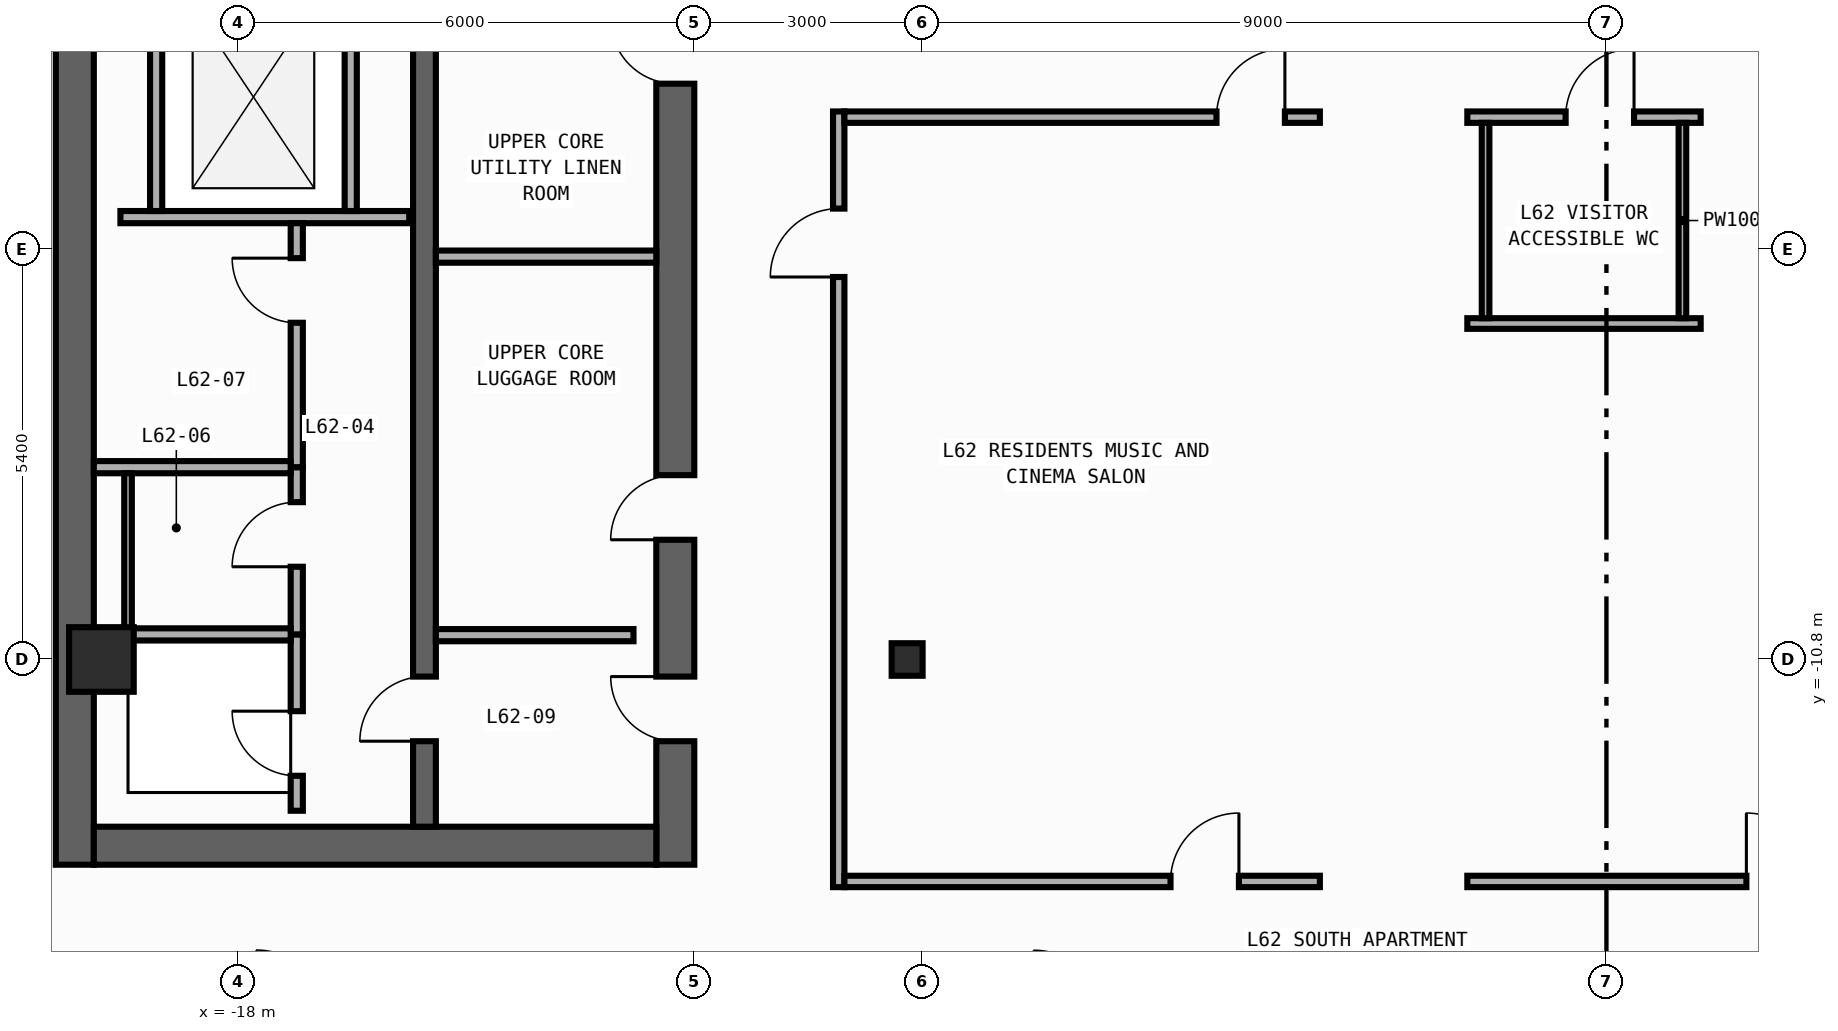
"""IFC4 building model, lengths in metres.
Left out: names, types, materials, properties, quantities, classifications, styles, units other than length and angle.
Written with IfcOpenShell. Run it as: python <this file> out.ifc"""

import sys

from ifc_helpers import new_model, si_unit, direction, frame, frame_2d, origin, origin_2d, place, context, subcontext, project, spatial, rectangle, i_section, extrude, element, fill, save


model = new_model("IFC4")
c1 = context("Model", 3, precision=1e-05, world=origin(), true_north=direction((0.0, 1.0)))
c2 = subcontext(c1, "Body", "Model", "MODEL_VIEW")
j1 = project(units=[si_unit("LENGTHUNIT", "METRE"), si_unit("PLANEANGLEUNIT", "RADIAN")], contexts=[c1])
p1 = place(None, origin())
s1 = spatial("IfcSite", under=j1, at=p1, CompositionType="ELEMENT")
p2 = place(p1, origin())
s2 = spatial("IfcBuilding", under=s1, at=p2, CompositionType="ELEMENT")
p3 = place(p2, frame((0.0, 0.0, 262.0)))
s3 = spatial("IfcBuildingStorey", under=s2, at=p3, CompositionType="ELEMENT", Elevation=262.0)
p4 = place(p3, frame((-20.15, -13.5, 0.0), z_axis=(0.0, 0.0, 1.0), x_axis=(0.0, 1.0, 0.0)))
e1 = element("IfcWall", 1, at=p4, inside=s3, PredefinedType="SHEAR", context=c2, shape_type="SweptSolid", body=[
    extrude(rectangle(XDim=27.0, YDim=0.5, at=frame_2d((13.5, 0.0))), origin(), (0.0, 0.0, 1.0), 3.34),
])
p5 = place(p3, frame((-12.25, -13.5, 0.0), z_axis=(0.0, 0.0, 1.0), x_axis=(0.0, 1.0, 0.0)))
e2 = element("IfcWall", 2, at=p5, inside=s3, PredefinedType="SHEAR", context=c2, shape_type="SweptSolid", body=[
    extrude(rectangle(XDim=27.0, YDim=0.5, at=frame_2d((13.5, 0.0))), origin(), (0.0, 0.0, 1.0), 3.34),
])
p6 = place(p5, frame((15.175, 0.0, 0.0)))
e3 = element("IfcOpeningElement", 3, at=p6, cuts=e2, PredefinedType="OPENING", context=c2, shape_type="SweptSolid", body=[
    extrude(rectangle(XDim=0.85, YDim=2.1, at=frame_2d((0.425, 1.05))), frame((0.0, 0.26, 0.0), z_axis=(0.0, -1.0, 0.0), x_axis=(1.0, 0.0, 0.0)), (0.0, 0.0, 1.0), 0.52),
])
p7 = place(p5, frame((21.275, 0.0, 0.0)))
e4 = element("IfcOpeningElement", 4, at=p7, cuts=e2, PredefinedType="OPENING", context=c2, shape_type="SweptSolid", body=[
    extrude(rectangle(XDim=0.85, YDim=2.1, at=frame_2d((0.425, 1.05))), frame((0.0, 0.26, 0.0), z_axis=(0.0, -1.0, 0.0), x_axis=(1.0, 0.0, 0.0)), (0.0, 0.0, 1.0), 0.52),
])
p8 = place(p5, frame((4.275, 0.0, 0.0)))
e5 = element("IfcOpeningElement", 5, at=p8, cuts=e2, PredefinedType="OPENING", context=c2, shape_type="SweptSolid", body=[
    extrude(rectangle(XDim=0.85, YDim=2.1, at=frame_2d((0.425, 1.05))), frame((0.0, 0.26, 0.0), z_axis=(0.0, -1.0, 0.0), x_axis=(1.0, 0.0, 0.0)), (0.0, 0.0, 1.0), 0.52),
])
p9 = place(p5, frame((10.275, 0.0, 0.0)))
e6 = element("IfcOpeningElement", 6, at=p9, cuts=e2, PredefinedType="OPENING", context=c2, shape_type="SweptSolid", body=[
    extrude(rectangle(XDim=0.85, YDim=2.1, at=frame_2d((0.425, 1.05))), frame((0.0, 0.26, 0.0), z_axis=(0.0, -1.0, 0.0), x_axis=(1.0, 0.0, 0.0)), (0.0, 0.0, 1.0), 0.52),
])
p10 = place(p5, frame((12.725, 0.0, 0.0)))
e7 = element("IfcOpeningElement", 7, at=p10, cuts=e2, PredefinedType="OPENING", context=c2, shape_type="SweptSolid", body=[
    extrude(rectangle(XDim=1.15, YDim=2.2, at=frame_2d((0.575, 1.1))), frame((0.0, 0.26, 0.0), z_axis=(0.0, -1.0, 0.0), x_axis=(1.0, 0.0, 0.0)), (0.0, 0.0, 1.0), 0.52),
])
p11 = place(p5, frame((1.625, 0.0, 0.0)))
e8 = element("IfcOpeningElement", 8, at=p11, cuts=e2, PredefinedType="OPENING", context=c2, shape_type="SweptSolid", body=[
    extrude(rectangle(XDim=0.85, YDim=2.1, at=frame_2d((0.425, 1.05))), frame((0.0, 0.26, 0.0), z_axis=(0.0, -1.0, 0.0), x_axis=(1.0, 0.0, 0.0)), (0.0, 0.0, 1.0), 0.52),
])
p12 = place(p3, frame((-19.9, -13.25, 0.0), z_axis=(0.0, 0.0, 1.0), x_axis=(1.0, 0.0, 0.0)))
e9 = element("IfcWall", 9, at=p12, inside=s3, PredefinedType="SHEAR", context=c2, shape_type="SweptSolid", body=[
    extrude(rectangle(XDim=7.4, YDim=0.5, at=frame_2d((3.7, 0.0))), origin(), (0.0, 0.0, 1.0), 3.34),
])
p13 = place(p3, frame((-15.55, -13.0, 0.0), z_axis=(0.0, 0.0, 1.0), x_axis=(0.0, 1.0, 0.0)))
e10 = element("IfcWall", 10, at=p13, inside=s3, PredefinedType="SHEAR", context=c2, shape_type="SweptSolid", body=[
    extrude(rectangle(XDim=26.0, YDim=0.3, at=frame_2d((13.0, 0.0))), origin(), (0.0, 0.0, 1.0), 3.34),
])
p14 = place(p13, frame((12.225, 0.0, 0.0)))
e11 = element("IfcOpeningElement", 11, at=p14, cuts=e10, PredefinedType="OPENING", context=c2, shape_type="SweptSolid", body=[
    extrude(rectangle(XDim=1.15, YDim=2.2, at=frame_2d((0.575, 1.1))), frame((0.0, 0.16, 0.0), z_axis=(0.0, -1.0, 0.0), x_axis=(1.0, 0.0, 0.0)), (0.0, 0.0, 1.0), 0.32),
])
p15 = place(p13, frame((1.125, 0.0, 0.0)))
e12 = element("IfcOpeningElement", 12, at=p15, cuts=e10, PredefinedType="OPENING", context=c2, shape_type="SweptSolid", body=[
    extrude(rectangle(XDim=0.85, YDim=2.1, at=frame_2d((0.425, 1.05))), frame((0.0, 0.16, 0.0), z_axis=(0.0, -1.0, 0.0), x_axis=(1.0, 0.0, 0.0)), (0.0, 0.0, 1.0), 0.32),
])
p16 = place(p3, frame((-9.2, -10.8, 0.0), z_axis=(0.0, 0.0, 1.0), x_axis=(1.0, 0.0, 0.0)))
e13 = element("IfcColumn", 13, at=p16, inside=s3, PredefinedType="COLUMN", context=c2, shape_type="SweptSolid", body=[
    extrude(i_section(OverallWidth=0.407, OverallDepth=0.428, WebThickness=0.02, FlangeThickness=0.035, FilletRadius=0.022, at=origin_2d()), origin(), (0.0, 0.0, 1.0), 3.6),
])
p17 = place(p3, frame((-19.8, -10.8, 0.0), z_axis=(0.0, 0.0, 1.0), x_axis=(1.0, 0.0, 0.0)))
e14 = element("IfcColumn", 14, at=p17, inside=s3, PredefinedType="COLUMN", context=c2, shape_type="SweptSolid", body=[
    extrude(rectangle(XDim=0.85, YDim=0.85, at=origin_2d()), origin(), (0.0, 0.0, 1.0), 3.6),
])
p18 = place(p3, frame((-19.55, -4.98, 0.0), z_axis=(0.0, 0.0, 1.0), x_axis=(1.0, 0.0, 0.0)))
e15 = element("IfcWall", 15, at=p18, inside=s3, PredefinedType="STANDARD", context=c2, shape_type="SweptSolid", body=[
    extrude(rectangle(XDim=3.8, YDim=0.16, at=frame_2d((1.9, 0.0))), origin(), (0.0, 0.0, 1.0), 3.34),
])
for number, where, z_axis, x_axis in (
    (16, (-19.08, -4.9, 0.0), (0.0, 0.0, 1.0), (0.0, 1.0, 0.0)),
    (17, (-16.52, -4.9, 0.0), (0.0, 0.0, 1.0), (0.0, 1.0, 0.0)),
):
    element("IfcWall", number, at=place(p3, frame(where, z_axis=z_axis, x_axis=x_axis)), inside=s3, PredefinedType="STANDARD", context=c2, shape_type="SweptSolid", body=[
        extrude(rectangle(XDim=2.96, YDim=0.16, at=frame_2d((1.48, 0.0))), origin(), (0.0, 0.0, 1.0), 3.34),
    ])
p19 = place(p3, frame((-15.4, -10.48, 0.0), z_axis=(0.0, 0.0, 1.0), x_axis=(1.0, 0.0, 0.0)))
e18 = element("IfcWall", 18, at=p19, inside=s3, PredefinedType="STANDARD", context=c2, shape_type="SweptSolid", body=[
    extrude(rectangle(XDim=2.6, YDim=0.16, at=frame_2d((1.3, 0.0))), origin(), (0.0, 0.0, 1.0), 3.34),
])
p20 = place(p3, frame((-17.23, -12.79, 0.0), z_axis=(0.0, 0.0, 1.0), x_axis=(0.0, 1.0, 0.0)))
e19 = element("IfcWall", 19, at=p20, inside=s3, PredefinedType="PARTITIONING", context=c2, shape_type="SweptSolid", body=[
    extrude(rectangle(XDim=2.32, YDim=0.16, at=frame_2d((1.16, 0.0))), origin(), (0.0, 0.0, 1.0), 3.34),
])
p21 = place(p20, frame((0.46, 0.0, 0.0)))
e20 = element("IfcOpeningElement", 20, at=p21, cuts=e19, PredefinedType="OPENING", context=c2, shape_type="SweptSolid", body=[
    extrude(rectangle(XDim=0.85, YDim=2.1, at=frame_2d((0.425, 1.05))), frame((0.0, 0.09, 0.0), z_axis=(0.0, -1.0, 0.0), x_axis=(1.0, 0.0, 0.0)), (0.0, 0.0, 1.0), 0.18),
])
p22 = place(p3, frame((-17.23, -10.47, 0.0), z_axis=(0.0, 0.0, 1.0), x_axis=(0.0, 1.0, 0.0)))
e21 = element("IfcWall", 21, at=p22, inside=s3, PredefinedType="PARTITIONING", context=c2, shape_type="SweptSolid", body=[
    extrude(rectangle(XDim=2.2, YDim=0.16, at=frame_2d((1.1, 0.0))), origin(), (0.0, 0.0, 1.0), 3.34),
])
p23 = place(p22, frame((0.89, 0.0, 0.0)))
e22 = element("IfcOpeningElement", 22, at=p23, cuts=e21, PredefinedType="OPENING", context=c2, shape_type="SweptSolid", body=[
    extrude(rectangle(XDim=0.85, YDim=2.1, at=frame_2d((0.425, 1.05))), frame((0.0, 0.09, 0.0), z_axis=(0.0, -1.0, 0.0), x_axis=(1.0, 0.0, 0.0)), (0.0, 0.0, 1.0), 0.18),
])
p24 = place(p3, frame((-17.23, -8.27, 0.0), z_axis=(0.0, 0.0, 1.0), x_axis=(0.0, 1.0, 0.0)))
e23 = element("IfcWall", 23, at=p24, inside=s3, PredefinedType="PARTITIONING", context=c2, shape_type="SweptSolid", body=[
    extrude(rectangle(XDim=3.21, YDim=0.16, at=frame_2d((1.605, 0.0))), origin(), (0.0, 0.0, 1.0), 3.34),
])
p25 = place(p24, frame((1.9, 0.0, 0.0)))
e24 = element("IfcOpeningElement", 24, at=p25, cuts=e23, PredefinedType="OPENING", context=c2, shape_type="SweptSolid", body=[
    extrude(rectangle(XDim=0.85, YDim=2.1, at=frame_2d((0.425, 1.05))), frame((0.0, 0.09, 0.0), z_axis=(0.0, -1.0, 0.0), x_axis=(1.0, 0.0, 0.0)), (0.0, 0.0, 1.0), 0.18),
])
p26 = place(p3, frame((-19.75, -10.47, 0.0), z_axis=(0.0, 0.0, 1.0), x_axis=(1.0, 0.0, 0.0)))
e25 = element("IfcWall", 25, at=p26, inside=s3, PredefinedType="PARTITIONING", context=c2, shape_type="SweptSolid", body=[
    extrude(rectangle(XDim=2.44, YDim=0.16, at=frame_2d((1.22, 0.0))), origin(), (0.0, 0.0, 1.0), 3.34),
])
p27 = place(p3, frame((-19.9, -8.27, 0.0), z_axis=(0.0, 0.0, 1.0), x_axis=(1.0, 0.0, 0.0)))
e26 = element("IfcWall", 26, at=p27, inside=s3, PredefinedType="PARTITIONING", context=c2, shape_type="SweptSolid", body=[
    extrude(rectangle(XDim=2.59, YDim=0.16, at=frame_2d((1.295, 0.0))), origin(), (0.0, 0.0, 1.0), 3.34),
])
p28 = place(p3, frame((-15.4, -5.5, 0.0), z_axis=(0.0, 0.0, 1.0), x_axis=(1.0, 0.0, 0.0)))
e27 = element("IfcWall", 27, at=p28, inside=s3, PredefinedType="PARTITIONING", context=c2, shape_type="SweptSolid", body=[
    extrude(rectangle(XDim=2.9, YDim=0.16, at=frame_2d((1.45, 0.0))), origin(), (0.0, 0.0, 1.0), 3.34),
])
p29 = place(p3, frame((-10.1, -13.795, 0.0), z_axis=(0.0, 0.0, 1.0), x_axis=(0.0, 1.0, 0.0)))
e28 = element("IfcWall", 28, at=p29, inside=s3, PredefinedType="PARTITIONING", context=c2, shape_type="SweptSolid", body=[
    extrude(rectangle(XDim=10.205, YDim=0.15, at=frame_2d((5.103, 0.0))), origin(), (0.0, 0.0, 1.0), 3.34),
])
p30 = place(p29, frame((8.027, 0.0, 0.0)))
e29 = element("IfcOpeningElement", 29, at=p30, cuts=e28, PredefinedType="OPENING", context=c2, shape_type="SweptSolid", body=[
    extrude(rectangle(XDim=0.9, YDim=2.15, at=frame_2d((0.45, 1.075))), frame((0.0, 0.085, 0.0), z_axis=(0.0, -1.0, 0.0), x_axis=(1.0, 0.0, 0.0)), (0.0, 0.0, 1.0), 0.17),
])
p31 = place(p3, frame((-10.025, -3.665, 0.0), z_axis=(0.0, 0.0, 1.0), x_axis=(1.0, 0.0, 0.0)))
e30 = element("IfcWall", 30, at=p31, inside=s3, PredefinedType="PARTITIONING", context=c2, shape_type="SweptSolid", body=[
    extrude(rectangle(XDim=6.255, YDim=0.15, at=frame_2d((3.127, 0.0))), origin(), (0.0, 0.0, 1.0), 3.34),
])
p32 = place(p31, frame((4.895, 0.0, 0.0)))
e31 = element("IfcOpeningElement", 31, at=p32, cuts=e30, PredefinedType="OPENING", context=c2, shape_type="SweptSolid", body=[
    extrude(rectangle(XDim=0.9, YDim=2.15, at=frame_2d((0.45, 1.075))), frame((0.0, 0.085, 0.0), z_axis=(0.0, -1.0, 0.0), x_axis=(1.0, 0.0, 0.0)), (0.0, 0.0, 1.0), 0.17),
])
p33 = place(p3, frame((-1.83, -3.665, 0.0), z_axis=(0.0, 0.0, 1.0), x_axis=(1.0, 0.0, 0.0)))
e32 = element("IfcWall", 32, at=p33, inside=s3, PredefinedType="PARTITIONING", context=c2, shape_type="SweptSolid", body=[
    extrude(rectangle(XDim=3.07, YDim=0.15, at=frame_2d((1.535, 0.0))), origin(), (0.0, 0.0, 1.0), 3.34),
])
p34 = place(p33, frame((1.293, 0.0, 0.0)))
e33 = element("IfcOpeningElement", 33, at=p34, cuts=e32, PredefinedType="OPENING", context=c2, shape_type="SweptSolid", body=[
    extrude(rectangle(XDim=0.9, YDim=2.15, at=frame_2d((0.45, 1.075))), frame((0.0, 0.085, 0.0), z_axis=(0.0, -1.0, 0.0), x_axis=(1.0, 0.0, 0.0)), (0.0, 0.0, 1.0), 0.17),
])
p35 = place(p3, frame((-10.025, -13.72, 0.0), z_axis=(0.0, 0.0, 1.0), x_axis=(1.0, 0.0, 0.0)))
e34 = element("IfcWall", 34, at=p35, inside=s3, PredefinedType="PARTITIONING", context=c2, shape_type="SweptSolid", body=[
    extrude(rectangle(XDim=6.255, YDim=0.15, at=frame_2d((3.127, 0.0))), origin(), (0.0, 0.0, 1.0), 3.34),
])
p36 = place(p35, frame((4.29, 0.0, 0.0)))
e35 = element("IfcOpeningElement", 35, at=p36, cuts=e34, PredefinedType="OPENING", context=c2, shape_type="SweptSolid", body=[
    extrude(rectangle(XDim=0.9, YDim=2.15, at=frame_2d((0.45, 1.075))), frame((0.0, 0.085, 0.0), z_axis=(0.0, -1.0, 0.0), x_axis=(1.0, 0.0, 0.0)), (0.0, 0.0, 1.0), 0.17),
])
p37 = place(p3, frame((-1.83, -13.72, 0.0), z_axis=(0.0, 0.0, 1.0), x_axis=(1.0, 0.0, 0.0)))
e36 = element("IfcWall", 36, at=p37, inside=s3, PredefinedType="PARTITIONING", context=c2, shape_type="SweptSolid", body=[
    extrude(rectangle(XDim=11.855, YDim=0.15, at=frame_2d((5.927, 0.0))), origin(), (0.0, 0.0, 1.0), 3.34),
])
p38 = place(p37, frame((3.671, 0.0, 0.0)))
e37 = element("IfcOpeningElement", 37, at=p38, cuts=e36, PredefinedType="OPENING", context=c2, shape_type="SweptSolid", body=[
    extrude(rectangle(XDim=0.9, YDim=2.15, at=frame_2d((0.45, 1.075))), frame((0.0, 0.085, 0.0), z_axis=(0.0, -1.0, 0.0), x_axis=(1.0, 0.0, 0.0)), (0.0, 0.0, 1.0), 0.17),
])
p39 = place(p3, frame((-1.83, -6.38, 0.0), z_axis=(0.0, 0.0, 1.0), x_axis=(1.0, 0.0, 0.0)))
e38 = element("IfcWall", 38, at=p39, inside=s3, PredefinedType="PARTITIONING", context=c2, shape_type="SweptSolid", body=[
    extrude(rectangle(XDim=3.07, YDim=0.14, at=frame_2d((1.535, 0.0))), origin(), (0.0, 0.0, 1.0), 3.34),
])
p40 = place(p3, frame((-19.45, -10.39, 0.0), z_axis=(0.0, 0.0, 1.0), x_axis=(0.0, 1.0, 0.0)))
e39 = element("IfcWall", 39, at=p40, inside=s3, PredefinedType="PARTITIONING", context=c2, shape_type="SweptSolid", body=[
    extrude(rectangle(XDim=2.04, YDim=0.1, at=frame_2d((1.02, 0.0))), origin(), (0.0, 0.0, 1.0), 3.34),
])
for number, where, z_axis, x_axis in (
    (40, (1.0, -3.74, 0.0), (0.0, 0.0, 1.0), (0.0, -1.0, 0.0)),
    (41, (-1.59, -6.31, 0.0), (0.0, 0.0, 1.0), (0.0, 1.0, 0.0)),
):
    element("IfcWall", number, at=place(p3, frame(where, z_axis=z_axis, x_axis=x_axis)), inside=s3, PredefinedType="PARTITIONING", context=c2, shape_type="SweptSolid", body=[
        extrude(rectangle(XDim=2.57, YDim=0.1, at=frame_2d((1.285, 0.0))), origin(), (0.0, 0.0, 1.0), 3.34),
    ])
p41 = place(p8, origin())
e42 = element("IfcDoor", 42, at=p41, inside=s3, OperationType="SINGLE_SWING_LEFT", PredefinedType="DOOR", context=c2, shape_type="SweptSolid", body=[
    extrude(rectangle(XDim=0.85, YDim=2.1, at=frame_2d((0.425, 1.05))), frame((0.0, 0.025, 0.0), z_axis=(0.0, -1.0, 0.0), x_axis=(1.0, 0.0, 0.0)), (0.0, 0.0, 1.0), 0.05),
])
fill(e5, e42)
p42 = place(p9, origin())
e43 = element("IfcDoor", 43, at=p42, inside=s3, OperationType="SINGLE_SWING_RIGHT", PredefinedType="DOOR", context=c2, shape_type="SweptSolid", body=[
    extrude(rectangle(XDim=0.85, YDim=2.1, at=frame_2d((0.425, 1.05))), frame((0.0, 0.025, 0.0), z_axis=(0.0, -1.0, 0.0), x_axis=(1.0, 0.0, 0.0)), (0.0, 0.0, 1.0), 0.05),
])
fill(e6, e43)
p43 = place(p11, origin())
e44 = element("IfcDoor", 44, at=p43, inside=s3, OperationType="SINGLE_SWING_RIGHT", PredefinedType="DOOR", context=c2, shape_type="SweptSolid", body=[
    extrude(rectangle(XDim=0.85, YDim=2.1, at=frame_2d((0.425, 1.05))), frame((0.0, 0.025, 0.0), z_axis=(0.0, -1.0, 0.0), x_axis=(1.0, 0.0, 0.0)), (0.0, 0.0, 1.0), 0.05),
])
fill(e8, e44)
p44 = place(p15, origin())
e45 = element("IfcDoor", 45, at=p44, inside=s3, OperationType="SINGLE_SWING_LEFT", PredefinedType="DOOR", context=c2, shape_type="SweptSolid", body=[
    extrude(rectangle(XDim=0.85, YDim=2.1, at=frame_2d((0.425, 1.05))), frame((0.0, 0.025, 0.0), z_axis=(0.0, -1.0, 0.0), x_axis=(1.0, 0.0, 0.0)), (0.0, 0.0, 1.0), 0.05),
])
fill(e12, e45)
p45 = place(p21, origin())
e46 = element("IfcDoor", 46, at=p45, inside=s3, OperationType="SINGLE_SWING_RIGHT", PredefinedType="DOOR", context=c2, shape_type="SweptSolid", body=[
    extrude(rectangle(XDim=0.85, YDim=2.1, at=frame_2d((0.425, 1.05))), frame((0.0, 0.025, 0.0), z_axis=(0.0, -1.0, 0.0), x_axis=(1.0, 0.0, 0.0)), (0.0, 0.0, 1.0), 0.05),
])
fill(e20, e46)
p46 = place(p23, origin())
e47 = element("IfcDoor", 47, at=p46, inside=s3, OperationType="SINGLE_SWING_LEFT", PredefinedType="DOOR", context=c2, shape_type="SweptSolid", body=[
    extrude(rectangle(XDim=0.85, YDim=2.1, at=frame_2d((0.425, 1.05))), frame((0.0, 0.025, 0.0), z_axis=(0.0, -1.0, 0.0), x_axis=(1.0, 0.0, 0.0)), (0.0, 0.0, 1.0), 0.05),
])
fill(e22, e47)
p47 = place(p25, origin())
e48 = element("IfcDoor", 48, at=p47, inside=s3, OperationType="SINGLE_SWING_RIGHT", PredefinedType="DOOR", context=c2, shape_type="SweptSolid", body=[
    extrude(rectangle(XDim=0.85, YDim=2.1, at=frame_2d((0.425, 1.05))), frame((0.0, 0.025, 0.0), z_axis=(0.0, -1.0, 0.0), x_axis=(1.0, 0.0, 0.0)), (0.0, 0.0, 1.0), 0.05),
])
fill(e24, e48)
p48 = place(p30, origin())
e49 = element("IfcDoor", 49, at=p48, inside=s3, OperationType="SINGLE_SWING_LEFT", PredefinedType="DOOR", context=c2, shape_type="SweptSolid", body=[
    extrude(rectangle(XDim=0.9, YDim=2.15, at=frame_2d((0.45, 1.075))), frame((0.0, 0.025, 0.0), z_axis=(0.0, -1.0, 0.0), x_axis=(1.0, 0.0, 0.0)), (0.0, 0.0, 1.0), 0.05),
])
fill(e29, e49)
p49 = place(p32, origin())
e50 = element("IfcDoor", 50, at=p49, inside=s3, OperationType="SINGLE_SWING_RIGHT", PredefinedType="DOOR", context=c2, shape_type="SweptSolid", body=[
    extrude(rectangle(XDim=0.9, YDim=2.15, at=frame_2d((0.45, 1.075))), frame((0.0, 0.025, 0.0), z_axis=(0.0, -1.0, 0.0), x_axis=(1.0, 0.0, 0.0)), (0.0, 0.0, 1.0), 0.05),
])
fill(e31, e50)
p50 = place(p34, origin())
e51 = element("IfcDoor", 51, at=p50, inside=s3, OperationType="SINGLE_SWING_RIGHT", PredefinedType="DOOR", context=c2, shape_type="SweptSolid", body=[
    extrude(rectangle(XDim=0.9, YDim=2.15, at=frame_2d((0.45, 1.075))), frame((0.0, 0.025, 0.0), z_axis=(0.0, -1.0, 0.0), x_axis=(1.0, 0.0, 0.0)), (0.0, 0.0, 1.0), 0.05),
])
fill(e33, e51)
p51 = place(p36, origin())
e52 = element("IfcDoor", 52, at=p51, inside=s3, OperationType="SINGLE_SWING_RIGHT", PredefinedType="DOOR", context=c2, shape_type="SweptSolid", body=[
    extrude(rectangle(XDim=0.9, YDim=2.15, at=frame_2d((0.45, 1.075))), frame((0.0, 0.025, 0.0), z_axis=(0.0, -1.0, 0.0), x_axis=(1.0, 0.0, 0.0)), (0.0, 0.0, 1.0), 0.05),
])
fill(e35, e52)
p52 = place(p38, origin())
e53 = element("IfcDoor", 53, at=p52, inside=s3, OperationType="SINGLE_SWING_LEFT", PredefinedType="DOOR", context=c2, shape_type="SweptSolid", body=[
    extrude(rectangle(XDim=0.9, YDim=2.15, at=frame_2d((0.45, 1.075))), frame((0.0, 0.025, 0.0), z_axis=(0.0, -1.0, 0.0), x_axis=(1.0, 0.0, 0.0)), (0.0, 0.0, 1.0), 0.05),
])
fill(e37, e53)
save(model, sys.argv[1])
